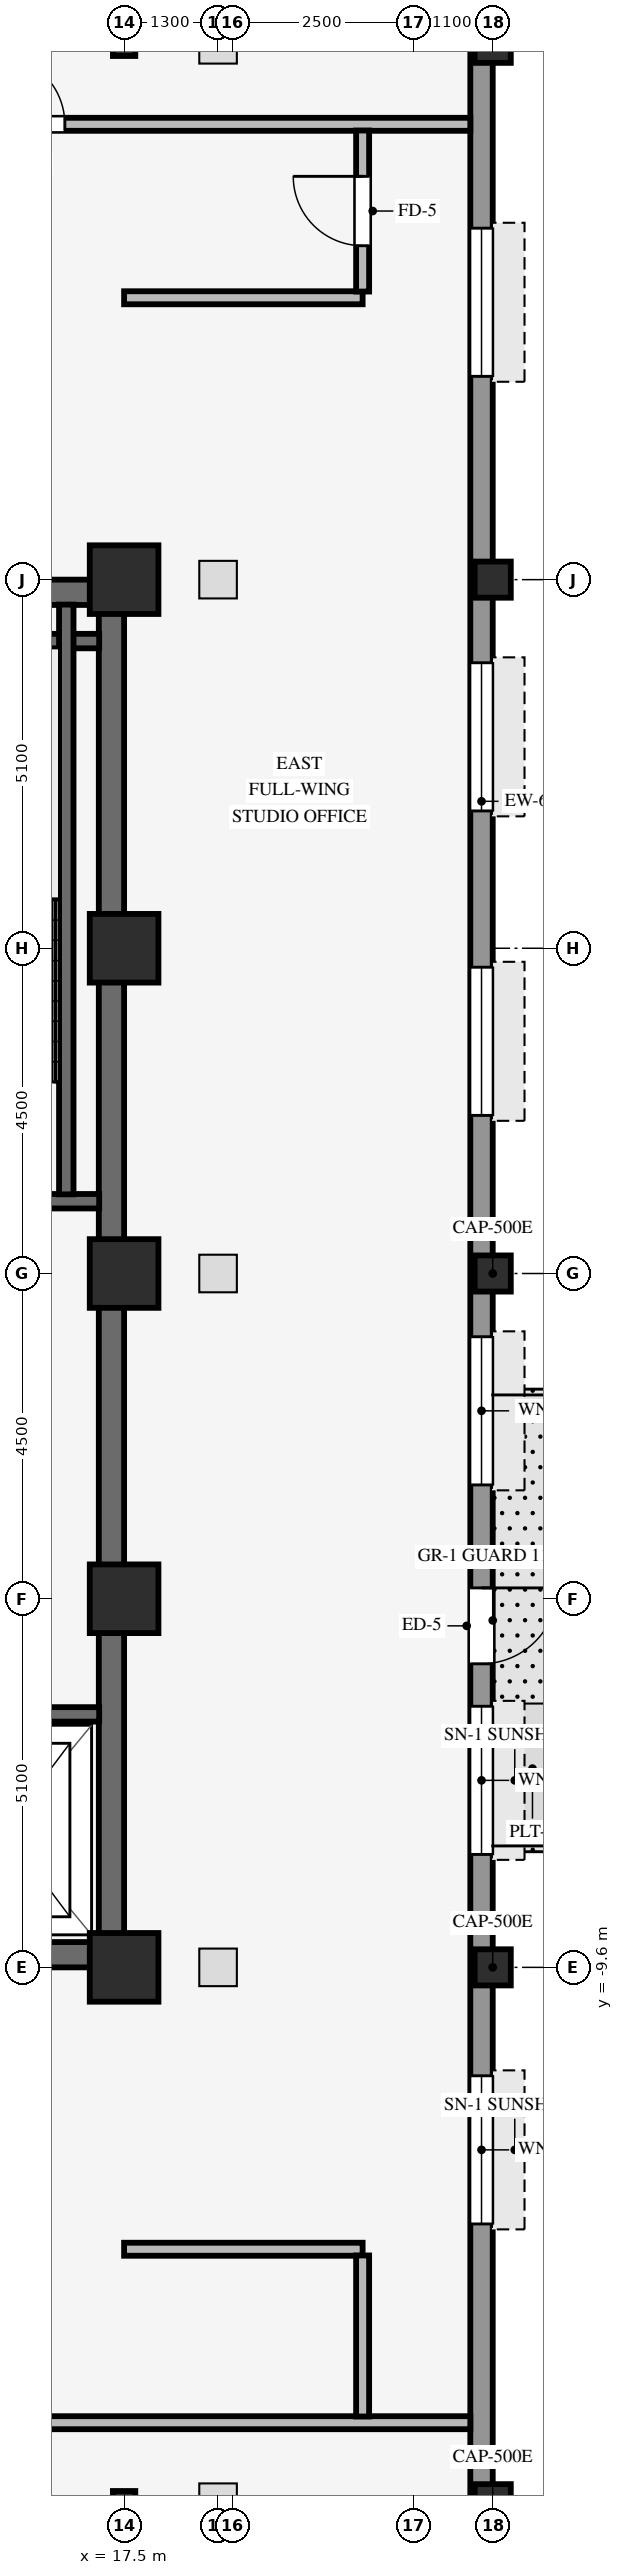
"""IFC4 building model, lengths in metres.
Left out: names, types, materials, properties, quantities, classifications, styles, units other than length and angle.
Written with IfcOpenShell. Run it as: python <this file> out.ifc"""

import sys

from ifc_helpers import new_model, si_unit, direction, frame, frame_2d, origin, origin_2d, place, context, subcontext, project, spatial, rectangle, hollow_rectangle, i_section, extrude, source, transform, mapped, element, fill, save


model = new_model("IFC4")
c1 = context("Model", 3, precision=1e-05, world=origin(), true_north=direction((0.0, 1.0)))
c2 = subcontext(c1, "Body", "Model", "MODEL_VIEW")
j1 = project(units=[si_unit("LENGTHUNIT", "METRE"), si_unit("PLANEANGLEUNIT", "RADIAN")], contexts=[c1])
p1 = place(None, origin())
s1 = spatial("IfcSite", under=j1, at=p1, CompositionType="ELEMENT")
p2 = place(p1, origin())
s2 = spatial("IfcBuilding", under=s1, at=p2, CompositionType="ELEMENT")
p3 = place(p2, frame((0.0, 0.0, 205.5)))
s3 = spatial("IfcBuildingStorey", under=s2, at=p3, CompositionType="ELEMENT", Elevation=205.5)
for number, where, z_axis, x_axis in (
    (1, (9.0, -9.425, 0.0), (0.0, 0.0, 1.0), (1.0, 0.0, 0.0)),
    (2, (9.0, 9.425, 0.0), (0.0, 0.0, 1.0), (1.0, 0.0, 0.0)),
):
    element("IfcWall", number, at=place(p3, frame(where, z_axis=z_axis, x_axis=x_axis)), inside=s3, PredefinedType="SHEAR", context=c2, shape_type="SweptSolid", body=[
        extrude(rectangle(XDim=8.5, YDim=0.35, at=frame_2d((4.25, 0.0))), origin(), (0.0, 0.0, 1.0), 3.25),
    ])
p4 = place(p3, frame((17.325, -9.255, 0.0), z_axis=(0.0, 0.0, 1.0), x_axis=(0.0, 1.0, 0.0)))
e3 = element("IfcWall", 3, at=p4, inside=s3, PredefinedType="SHEAR", context=c2, shape_type="SweptSolid", body=[
    extrude(rectangle(XDim=18.51, YDim=0.35, at=frame_2d((9.255, 0.0))), origin(), (0.0, 0.0, 1.0), 3.25),
])
for number, where, z_axis, x_axis in (
    (4, (17.5, -9.6, 0.0), (0.0, 0.0, 1.0), (1.0, 0.0, 0.0)),
    (5, (17.5, -4.5, 0.0), (0.0, 0.0, 1.0), (1.0, 0.0, 0.0)),
    (6, (17.5, 4.5, 0.0), (0.0, 0.0, 1.0), (1.0, 0.0, 0.0)),
    (7, (17.5, 9.6, 0.0), (0.0, 0.0, 1.0), (1.0, 0.0, 0.0)),
    (8, (17.5, 0.0, 0.0), (0.0, 0.0, 1.0), (1.0, 0.0, 0.0)),
):
    element("IfcColumn", number, at=place(p3, frame(where, z_axis=z_axis, x_axis=x_axis)), inside=s3, PredefinedType="COLUMN", context=c2, shape_type="SweptSolid", body=[
        extrude(rectangle(XDim=0.95, YDim=0.95, at=origin_2d()), origin(), (0.0, 0.0, 1.0), 3.25),
    ])
for number, where, z_axis, x_axis in (
    (9, (22.6, -17.0, 0.0), (0.0, 0.0, 1.0), (1.0, 0.0, 0.0)),
    (10, (22.6, -9.6, 0.0), (0.0, 0.0, 1.0), (1.0, 0.0, 0.0)),
    (11, (22.6, 0.0, 0.0), (0.0, 0.0, 1.0), (1.0, 0.0, 0.0)),
    (12, (22.6, 9.6, 0.0), (0.0, 0.0, 1.0), (1.0, 0.0, 0.0)),
    (13, (22.6, 17.0, 0.0), (0.0, 0.0, 1.0), (1.0, 0.0, 0.0)),
):
    element("IfcColumn", number, at=place(p3, frame(where, z_axis=z_axis, x_axis=x_axis)), inside=s3, PredefinedType="COLUMN", context=c2, shape_type="SweptSolid", body=[
        extrude(hollow_rectangle(XDim=0.5, YDim=0.5, WallThickness=0.032, InnerFilletRadius=0.032, OuterFilletRadius=0.064, at=origin_2d()), origin(), (0.0, 0.0, 1.0), 3.25),
    ])
for number, where, z_axis, x_axis in (
    (14, (17.5, -17.0, 0.0), (0.0, 0.0, 1.0), (1.0, 0.0, 0.0)),
    (15, (17.5, 17.0, 0.0), (0.0, 0.0, 1.0), (1.0, 0.0, 0.0)),
):
    element("IfcColumn", number, at=place(p3, frame(where, z_axis=z_axis, x_axis=x_axis)), inside=s3, PredefinedType="COLUMN", context=c2, shape_type="SweptSolid", body=[
        extrude(i_section(OverallWidth=0.31, OverallDepth=0.31, WebThickness=0.015, FlangeThickness=0.015, FilletRadius=0.015, at=origin_2d()), origin(), (0.0, 0.0, 1.0), 3.25),
    ])
p5 = place(p3, frame((22.445, -20.794, 0.0), z_axis=(0.0, 0.0, 1.0), x_axis=(0.0, 1.0, 0.0)))
e16 = element("IfcWall", 16, at=p5, inside=s3, PredefinedType="STANDARD", context=c2, shape_type="SweptSolid", body=[
    extrude(rectangle(XDim=37.788, YDim=0.31, at=frame_2d((18.894, 0.0))), origin(), (0.0, 0.0, 1.0), 3.24),
])
p6 = place(p5, frame((16.444, 0.0, 0.0), z_axis=(0.0, 0.0, 1.0), x_axis=(-1.0, 0.0, 0.0)))
e17 = element("IfcOpeningElement", 17, at=p6, cuts=e16, PredefinedType="OPENING", context=c2, shape_type="SweptSolid", body=[
    extrude(rectangle(XDim=1.05, YDim=2.1, at=frame_2d((0.525, 1.05))), frame((0.0, 0.165, 0.0), z_axis=(0.0, -1.0, 0.0), x_axis=(1.0, 0.0, 0.0)), (0.0, 0.0, 1.0), 0.33),
])
p7 = place(p5, frame((7.644, 0.0, 0.8)))
e18 = element("IfcOpeningElement", 18, at=p7, cuts=e16, PredefinedType="OPENING", context=c2, shape_type="SweptSolid", body=[
    extrude(rectangle(XDim=2.05, YDim=1.52, at=frame_2d((1.025, 0.76))), frame((0.0, 0.165, 0.0), z_axis=(0.0, -1.0, 0.0), x_axis=(1.0, 0.0, 0.0)), (0.0, 0.0, 1.0), 0.33),
])
p8 = place(p5, frame((12.756, 0.0, 0.8)))
e19 = element("IfcOpeningElement", 19, at=p8, cuts=e16, PredefinedType="OPENING", context=c2, shape_type="SweptSolid", body=[
    extrude(rectangle(XDim=2.05, YDim=1.52, at=frame_2d((1.025, 0.76))), frame((0.0, 0.165, 0.0), z_axis=(0.0, -1.0, 0.0), x_axis=(1.0, 0.0, 0.0)), (0.0, 0.0, 1.0), 0.33),
])
p9 = place(p5, frame((17.869, 0.0, 0.8)))
e20 = element("IfcOpeningElement", 20, at=p9, cuts=e16, PredefinedType="OPENING", context=c2, shape_type="SweptSolid", body=[
    extrude(rectangle(XDim=2.05, YDim=1.52, at=frame_2d((1.025, 0.76))), frame((0.0, 0.165, 0.0), z_axis=(0.0, -1.0, 0.0), x_axis=(1.0, 0.0, 0.0)), (0.0, 0.0, 1.0), 0.33),
])
p10 = place(p5, frame((22.982, 0.0, 0.8)))
e21 = element("IfcOpeningElement", 21, at=p10, cuts=e16, PredefinedType="OPENING", context=c2, shape_type="SweptSolid", body=[
    extrude(rectangle(XDim=2.05, YDim=1.52, at=frame_2d((1.025, 0.76))), frame((0.0, 0.165, 0.0), z_axis=(0.0, -1.0, 0.0), x_axis=(1.0, 0.0, 0.0)), (0.0, 0.0, 1.0), 0.33),
])
p11 = place(p5, frame((27.194, 0.0, 0.8)))
e22 = element("IfcOpeningElement", 22, at=p11, cuts=e16, PredefinedType="OPENING", context=c2, shape_type="SweptSolid", body=[
    extrude(rectangle(XDim=2.05, YDim=1.52, at=frame_2d((1.025, 0.76))), frame((0.0, 0.165, 0.0), z_axis=(0.0, -1.0, 0.0), x_axis=(1.0, 0.0, 0.0)), (0.0, 0.0, 1.0), 0.33),
])
p12 = place(p5, frame((33.207, 0.0, 0.8)))
e23 = element("IfcOpeningElement", 23, at=p12, cuts=e16, PredefinedType="OPENING", context=c2, shape_type="SweptSolid", body=[
    extrude(rectangle(XDim=2.05, YDim=1.52, at=frame_2d((1.025, 0.76))), frame((0.0, 0.165, 0.0), z_axis=(0.0, -1.0, 0.0), x_axis=(1.0, 0.0, 0.0)), (0.0, 0.0, 1.0), 0.33),
])
for number, where, z_axis, x_axis in (
    (24, (13.535, 1.0, 0.0), (0.0, 0.0, 1.0), (1.0, 0.0, 0.0)),
    (25, (13.535, 8.75, 0.0), (0.0, 0.0, 1.0), (1.0, 0.0, 0.0)),
):
    element("IfcWall", number, at=place(p3, frame(where, z_axis=z_axis, x_axis=x_axis)), inside=s3, PredefinedType="SHEAR", context=c2, shape_type="SweptSolid", body=[
        extrude(rectangle(XDim=3.62, YDim=0.2, at=frame_2d((1.81, 0.0))), origin(), (0.0, 0.0, 1.0), 3.25),
    ])
p13 = place(p3, frame((16.7, 1.095, 0.0), z_axis=(0.0, 0.0, 1.0), x_axis=(0.0, 1.0, 0.0)))
e26 = element("IfcWall", 26, at=p13, inside=s3, PredefinedType="SHEAR", context=c2, shape_type="SweptSolid", body=[
    extrude(rectangle(XDim=8.16, YDim=0.2, at=frame_2d((4.08, 0.0))), origin(), (0.0, 0.0, 1.0), 3.25),
])
p14 = place(p3, frame((14.645, -6.1, 0.0), z_axis=(0.0, 0.0, 1.0), x_axis=(1.0, 0.0, 0.0)))
e27 = element("IfcWall", 27, at=p14, inside=s3, PredefinedType="SHEAR", context=c2, shape_type="SweptSolid", body=[
    extrude(rectangle(XDim=2.51, YDim=0.2, at=frame_2d((1.255, 0.0))), origin(), (0.0, 0.0, 1.0), 3.25),
])
p15 = place(p3, frame((-26.09, -15.9, 0.0), z_axis=(0.0, 0.0, 1.0), x_axis=(1.0, 0.0, 0.0)))
e28 = element("IfcWall", 28, at=p15, inside=s3, PredefinedType="PARTITIONING", context=c2, shape_type="SweptSolid", body=[
    extrude(rectangle(XDim=48.38, YDim=0.18, at=frame_2d((24.19, 0.0))), origin(), (0.0, 0.0, 1.0), 3.24),
])
p16 = place(p15, frame((15.56, 0.0, 0.0)))
e29 = element("IfcOpeningElement", 29, at=p16, cuts=e28, PredefinedType="OPENING", context=c2, shape_type="SweptSolid", body=[
    extrude(rectangle(XDim=0.96, YDim=2.1, at=frame_2d((0.48, 1.05))), frame((0.0, 0.1, 0.0), z_axis=(0.0, -1.0, 0.0), x_axis=(1.0, 0.0, 0.0)), (0.0, 0.0, 1.0), 0.2),
])
p17 = place(p15, frame((40.51, 0.0, 0.0)))
e30 = element("IfcOpeningElement", 30, at=p17, cuts=e28, PredefinedType="OPENING", context=c2, shape_type="SweptSolid", body=[
    extrude(rectangle(XDim=0.96, YDim=2.1, at=frame_2d((0.48, 1.05))), frame((0.0, 0.1, 0.0), z_axis=(0.0, -1.0, 0.0), x_axis=(1.0, 0.0, 0.0)), (0.0, 0.0, 1.0), 0.2),
])
p18 = place(p15, frame((6.66, 0.0, 0.0)))
e31 = element("IfcOpeningElement", 31, at=p18, cuts=e28, PredefinedType="OPENING", context=c2, shape_type="SweptSolid", body=[
    extrude(rectangle(XDim=0.96, YDim=2.1, at=frame_2d((0.48, 1.05))), frame((0.0, 0.1, 0.0), z_axis=(0.0, -1.0, 0.0), x_axis=(1.0, 0.0, 0.0)), (0.0, 0.0, 1.0), 0.2),
])
for number, where, z_axis, x_axis in (
    (32, (17.5, -13.5, 0.0), (0.0, 0.0, 1.0), (1.0, 0.0, 0.0)),
    (33, (17.5, 13.5, 0.0), (0.0, 0.0, 1.0), (1.0, 0.0, 0.0)),
):
    element("IfcWall", number, at=place(p3, frame(where, z_axis=z_axis, x_axis=x_axis)), inside=s3, PredefinedType="PARTITIONING", context=c2, shape_type="SweptSolid", body=[
        extrude(rectangle(XDim=3.3, YDim=0.18, at=frame_2d((1.65, 0.0))), origin(), (0.0, 0.0, 1.0), 2.888),
    ])
p19 = place(p3, frame((-26.09, 15.9, 0.0), z_axis=(0.0, 0.0, 1.0), x_axis=(1.0, 0.0, 0.0)))
e34 = element("IfcWall", 34, at=p19, inside=s3, PredefinedType="PARTITIONING", context=c2, shape_type="SweptSolid", body=[
    extrude(rectangle(XDim=48.38, YDim=0.18, at=frame_2d((24.19, 0.0))), origin(), (0.0, 0.0, 1.0), 3.24),
])
p20 = place(p19, frame((41.81, 0.0, 0.0)))
e35 = element("IfcOpeningElement", 35, at=p20, cuts=e34, PredefinedType="OPENING", context=c2, shape_type="SweptSolid", body=[
    extrude(rectangle(XDim=0.96, YDim=2.1, at=frame_2d((0.48, 1.05))), frame((0.0, 0.1, 0.0), z_axis=(0.0, -1.0, 0.0), x_axis=(1.0, 0.0, 0.0)), (0.0, 0.0, 1.0), 0.2),
])
p21 = place(p19, frame((17.985, 0.0, 0.0)))
e36 = element("IfcOpeningElement", 36, at=p21, cuts=e34, PredefinedType="OPENING", context=c2, shape_type="SweptSolid", body=[
    extrude(rectangle(XDim=0.96, YDim=2.1, at=frame_2d((0.48, 1.05))), frame((0.0, 0.1, 0.0), z_axis=(0.0, -1.0, 0.0), x_axis=(1.0, 0.0, 0.0)), (0.0, 0.0, 1.0), 0.2),
])
p22 = place(p19, frame((26.55, 0.0, 0.0)))
e37 = element("IfcOpeningElement", 37, at=p22, cuts=e34, PredefinedType="OPENING", context=c2, shape_type="SweptSolid", body=[
    extrude(rectangle(XDim=0.96, YDim=2.1, at=frame_2d((0.48, 1.05))), frame((0.0, 0.1, 0.0), z_axis=(0.0, -1.0, 0.0), x_axis=(1.0, 0.0, 0.0)), (0.0, 0.0, 1.0), 0.2),
])
p23 = place(p19, frame((10.935, 0.0, 0.0)))
e38 = element("IfcOpeningElement", 38, at=p23, cuts=e34, PredefinedType="OPENING", context=c2, shape_type="SweptSolid", body=[
    extrude(rectangle(XDim=0.96, YDim=2.1, at=frame_2d((0.48, 1.05))), frame((0.0, 0.1, 0.0), z_axis=(0.0, -1.0, 0.0), x_axis=(1.0, 0.0, 0.0)), (0.0, 0.0, 1.0), 0.2),
])
p24 = place(p19, frame((35.91, 0.0, 0.0)))
e39 = element("IfcOpeningElement", 39, at=p24, cuts=e34, PredefinedType="OPENING", context=c2, shape_type="SweptSolid", body=[
    extrude(rectangle(XDim=0.96, YDim=2.1, at=frame_2d((0.48, 1.05))), frame((0.0, 0.1, 0.0), z_axis=(0.0, -1.0, 0.0), x_axis=(1.0, 0.0, 0.0)), (0.0, 0.0, 1.0), 0.2),
])
p25 = place(p3, frame((20.8, -15.814, 0.0), z_axis=(0.0, 0.0, 1.0), x_axis=(0.0, 1.0, 0.0)))
e40 = element("IfcWall", 40, at=p25, inside=s3, PredefinedType="PARTITIONING", context=c2, shape_type="SweptSolid", body=[
    extrude(rectangle(XDim=2.228, YDim=0.18, at=frame_2d((1.114, 0.0))), origin(), (0.0, 0.0, 1.0), 3.24),
])
p26 = place(p3, frame((20.8, 13.586, 0.0), z_axis=(0.0, 0.0, 1.0), x_axis=(0.0, 1.0, 0.0)))
e41 = element("IfcWall", 41, at=p26, inside=s3, PredefinedType="PARTITIONING", context=c2, shape_type="SweptSolid", body=[
    extrude(rectangle(XDim=2.228, YDim=0.18, at=frame_2d((1.114, 0.0))), origin(), (0.0, 0.0, 1.0), 3.24),
])
p27 = place(p26, frame((0.634, 0.0, 0.0)))
e42 = element("IfcOpeningElement", 42, at=p27, cuts=e41, PredefinedType="OPENING", context=c2, shape_type="SweptSolid", body=[
    extrude(rectangle(XDim=0.96, YDim=2.1, at=frame_2d((0.48, 1.05))), frame((0.0, 0.1, 0.0), z_axis=(0.0, -1.0, 0.0), x_axis=(1.0, 0.0, 0.0)), (0.0, 0.0, 1.0), 0.2),
])
m1 = source(origin(), c2, "Body", "SweptSolid", [
    extrude(rectangle(XDim=1.05, YDim=2.1, at=frame_2d((0.525, 1.05))), frame((0.0, 0.025, 0.0), z_axis=(0.0, -1.0, 0.0), x_axis=(1.0, 0.0, 0.0)), (0.0, 0.0, 1.0), 0.05),
])
p28 = place(p6, origin())
e43 = element("IfcDoor", 43, at=p28, inside=s3, OperationType="SINGLE_SWING_LEFT", PredefinedType="DOOR", context=c2, shape_type="MappedRepresentation", body=[
    mapped(m1, transform((0.0, 0.0, 0.0), scale=1.0)),
])
fill(e17, e43)
m2 = source(origin(), c2, "Body", "SweptSolid", [
    extrude(rectangle(XDim=2.05, YDim=1.52, at=frame_2d((1.025, 0.76))), frame((0.0, 0.03, 0.0), z_axis=(0.0, -1.0, 0.0), x_axis=(1.0, 0.0, 0.0)), (0.0, 0.0, 1.0), 0.06),
])
p29 = place(p7, origin())
e44 = element("IfcWindow", 44, at=p29, inside=s3, PartitioningType="SINGLE_PANEL", PredefinedType="WINDOW", context=c2, shape_type="MappedRepresentation", body=[
    mapped(m2, transform((0.0, 0.0, 0.0), scale=1.0)),
])
fill(e18, e44)
p30 = place(p8, origin())
e45 = element("IfcWindow", 45, at=p30, inside=s3, PartitioningType="SINGLE_PANEL", PredefinedType="WINDOW", context=c2, shape_type="MappedRepresentation", body=[
    mapped(m2, transform((0.0, 0.0, 0.0), scale=1.0)),
])
fill(e19, e45)
p31 = place(p9, origin())
e46 = element("IfcWindow", 46, at=p31, inside=s3, PartitioningType="SINGLE_PANEL", PredefinedType="WINDOW", context=c2, shape_type="MappedRepresentation", body=[
    mapped(m2, transform((0.0, 0.0, 0.0), scale=1.0)),
])
fill(e20, e46)
p32 = place(p10, origin())
e47 = element("IfcWindow", 47, at=p32, inside=s3, PartitioningType="SINGLE_PANEL", PredefinedType="WINDOW", context=c2, shape_type="MappedRepresentation", body=[
    mapped(m2, transform((0.0, 0.0, 0.0), scale=1.0)),
])
fill(e21, e47)
p33 = place(p11, origin())
e48 = element("IfcWindow", 48, at=p33, inside=s3, PartitioningType="SINGLE_PANEL", PredefinedType="WINDOW", context=c2, shape_type="MappedRepresentation", body=[
    mapped(m2, transform((0.0, 0.0, 0.0), scale=1.0)),
])
fill(e22, e48)
p34 = place(p12, origin())
e49 = element("IfcWindow", 49, at=p34, inside=s3, PartitioningType="SINGLE_PANEL", PredefinedType="WINDOW", context=c2, shape_type="MappedRepresentation", body=[
    mapped(m2, transform((0.0, 0.0, 0.0), scale=1.0)),
])
fill(e23, e49)
m3 = source(origin(), c2, "Body", "SweptSolid", [
    extrude(rectangle(XDim=0.96, YDim=2.1, at=frame_2d((0.48, 1.05))), frame((0.0, 0.025, 0.0), z_axis=(0.0, -1.0, 0.0), x_axis=(1.0, 0.0, 0.0)), (0.0, 0.0, 1.0), 0.05),
])
p35 = place(p20, origin())
e50 = element("IfcDoor", 50, at=p35, inside=s3, OperationType="SINGLE_SWING_LEFT", PredefinedType="DOOR", context=c2, shape_type="MappedRepresentation", body=[
    mapped(m3, transform((0.0, 0.0, 0.0), scale=1.0)),
])
fill(e35, e50)
p36 = place(p27, origin())
e51 = element("IfcDoor", 51, at=p36, inside=s3, OperationType="SINGLE_SWING_RIGHT", PredefinedType="DOOR", context=c2, shape_type="MappedRepresentation", body=[
    mapped(m3, transform((0.0, 0.0, 0.0), scale=1.0)),
])
fill(e42, e51)
save(model, sys.argv[1])
